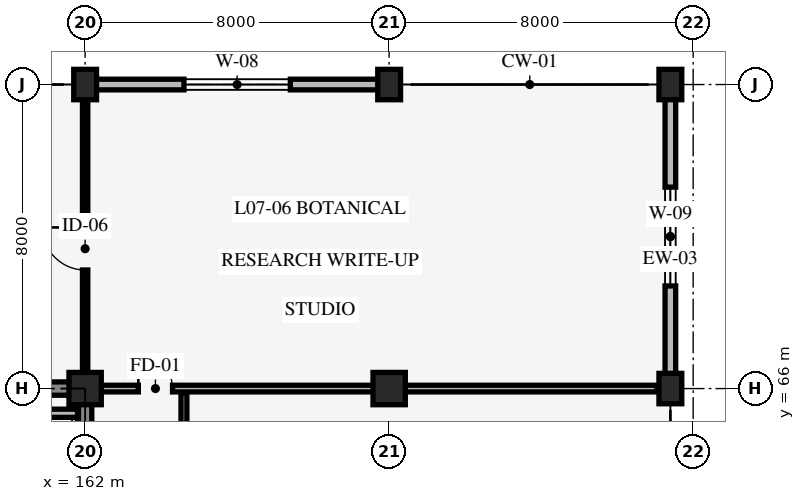
"""IFC4 building model, lengths in metres.
Left out: names, types, materials, properties, quantities, classifications, styles, units other than length and angle.
Written with IfcOpenShell. Run it as: python <this file> out.ifc"""

import sys

from ifc_helpers import new_model, si_unit, direction, frame, frame_2d, origin, origin_2d, place, context, subcontext, project, spatial, rectangle, extrude, element, fill, save


model = new_model("IFC4")
c1 = context("Model", 3, precision=1e-05, world=origin(), true_north=direction((0.0, 1.0)))
c2 = subcontext(c1, "Body", "Model", "MODEL_VIEW")
j1 = project(units=[si_unit("LENGTHUNIT", "METRE"), si_unit("PLANEANGLEUNIT", "RADIAN")], contexts=[c1])
p1 = place(None, origin())
s1 = spatial("IfcSite", under=j1, at=p1, CompositionType="ELEMENT")
p2 = place(p1, origin())
s2 = spatial("IfcBuilding", under=s1, at=p2, CompositionType="ELEMENT")
p3 = place(p2, frame((0.0, 0.0, 27.6)))
s3 = spatial("IfcBuildingStorey", under=s2, at=p3, CompositionType="ELEMENT", Elevation=27.6)
p4 = place(p3, frame((162.0, 58.0, 0.0), z_axis=(0.0, 0.0, 1.0), x_axis=(0.0, 1.0, 0.0)))
e1 = element("IfcWall", 1, at=p4, inside=s3, PredefinedType="SHEAR", context=c2, shape_type="SweptSolid", body=[
    extrude(rectangle(XDim=8.0, YDim=0.35, at=frame_2d((4.0, 0.0))), origin(), (0.0, 0.0, 1.0), 3.95),
])
p5 = place(p4, frame((3.275, 0.0, 0.0)))
e2 = element("IfcOpeningElement", 2, at=p5, cuts=e1, PredefinedType="OPENING", context=c2, shape_type="SweptSolid", body=[
    extrude(rectangle(XDim=1.05, YDim=2.2, at=frame_2d((0.525, 1.1))), frame((0.0, 0.185, 0.0), z_axis=(0.0, -1.0, 0.0), x_axis=(1.0, 0.0, 0.0)), (0.0, 0.0, 1.0), 0.37),
])
p6 = place(p4, frame((5.45, 0.0, 0.0)))
e3 = element("IfcOpeningElement", 3, at=p6, cuts=e1, PredefinedType="OPENING", context=c2, shape_type="SweptSolid", body=[
    extrude(rectangle(XDim=1.4, YDim=2.3, at=frame_2d((0.7, 1.15))), frame((0.0, 0.185, 0.0), z_axis=(0.0, -1.0, 0.0), x_axis=(1.0, 0.0, 0.0)), (0.0, 0.0, 1.0), 0.37),
])
p7 = place(p3, frame((162.0, 66.0, 0.0), z_axis=(0.0, 0.0, 1.0), x_axis=(-1.0, 0.0, 0.0)))
e4 = element("IfcWall", 4, at=p7, inside=s3, PredefinedType="SHEAR", context=c2, shape_type="SweptSolid", body=[
    extrude(rectangle(XDim=8.0, YDim=0.35, at=frame_2d((4.0, 0.0))), origin(), (0.0, 0.0, 1.0), 3.95),
])
p8 = place(p3, frame((162.0, 66.0, 0.0), z_axis=(0.0, 0.0, 1.0), x_axis=(1.0, 0.0, 0.0)))
e5 = element("IfcColumn", 5, at=p8, inside=s3, PredefinedType="COLUMN", context=c2, shape_type="SweptSolid", body=[
    extrude(rectangle(XDim=0.85, YDim=0.85, at=origin_2d()), origin(), (0.0, 0.0, 1.0), 4.2),
])
p9 = place(p3, frame((162.0, 74.0, 0.0), z_axis=(0.0, 0.0, 1.0), x_axis=(1.0, 0.0, 0.0)))
e6 = element("IfcColumn", 6, at=p9, inside=s3, PredefinedType="COLUMN", context=c2, shape_type="SweptSolid", body=[
    extrude(rectangle(XDim=0.6, YDim=0.8, at=origin_2d()), origin(), (0.0, 0.0, 1.0), 4.2),
])
p10 = place(p3, frame((170.0, 66.0, 0.0), z_axis=(0.0, 0.0, 1.0), x_axis=(1.0, 0.0, 0.0)))
e7 = element("IfcColumn", 7, at=p10, inside=s3, PredefinedType="COLUMN", context=c2, shape_type="SweptSolid", body=[
    extrude(rectangle(XDim=0.85, YDim=0.85, at=origin_2d()), origin(), (0.0, 0.0, 1.0), 4.2),
])
for number, where, z_axis, x_axis in (
    (8, (170.0, 74.0, 0.0), (0.0, 0.0, 1.0), (1.0, 0.0, 0.0)),
    (9, (177.4, 66.0, 0.0), (0.0, 0.0, 1.0), (1.0, 0.0, 0.0)),
    (10, (177.4, 74.0, 0.0), (0.0, 0.0, 1.0), (1.0, 0.0, 0.0)),
):
    element("IfcColumn", number, at=place(p3, frame(where, z_axis=z_axis, x_axis=x_axis)), inside=s3, PredefinedType="COLUMN", context=c2, shape_type="SweptSolid", body=[
        extrude(rectangle(XDim=0.6, YDim=0.8, at=origin_2d()), origin(), (0.0, 0.0, 1.0), 4.2),
    ])
p11 = place(p3, frame((162.0, 74.0, 0.0), z_axis=(0.0, 0.0, 1.0), x_axis=(1.0, 0.0, 0.0)))
e11 = element("IfcWall", 11, at=p11, inside=s3, PredefinedType="STANDARD", context=c2, shape_type="SweptSolid", body=[
    extrude(rectangle(XDim=8.0, YDim=0.28, at=frame_2d((4.0, 0.0))), origin(), (0.0, 0.0, 1.0), 3.24),
])
p12 = place(p11, frame((2.6, 0.0, 0.85)))
e12 = element("IfcOpeningElement", 12, at=p12, cuts=e11, PredefinedType="OPENING", context=c2, shape_type="SweptSolid", body=[
    extrude(rectangle(XDim=2.8, YDim=1.6, at=frame_2d((1.4, 0.8))), frame((0.0, 0.15, 0.0), z_axis=(0.0, -1.0, 0.0), x_axis=(1.0, 0.0, 0.0)), (0.0, 0.0, 1.0), 0.3),
])
p13 = place(p3, frame((177.4, 74.0, 0.0), z_axis=(0.0, 0.0, 1.0), x_axis=(0.0, -1.0, 0.0)))
e13 = element("IfcWall", 13, at=p13, inside=s3, PredefinedType="STANDARD", context=c2, shape_type="SweptSolid", body=[
    extrude(rectangle(XDim=8.0, YDim=0.28, at=frame_2d((4.0, 0.0))), origin(), (0.0, 0.0, 1.0), 3.29),
])
p14 = place(p13, frame((2.7, 0.0, 0.85)))
e14 = element("IfcOpeningElement", 14, at=p14, cuts=e13, PredefinedType="OPENING", context=c2, shape_type="SweptSolid", body=[
    extrude(rectangle(XDim=2.6, YDim=1.5, at=frame_2d((1.3, 0.75))), frame((0.0, 0.15, 0.0), z_axis=(0.0, -1.0, 0.0), x_axis=(1.0, 0.0, 0.0)), (0.0, 0.0, 1.0), 0.3),
])
p15 = place(p3, frame((159.38, 65.35, 0.0), z_axis=(0.0, 0.0, 1.0), x_axis=(1.0, 0.0, 0.0)))
e15 = element("IfcWall", 15, at=p15, inside=s3, PredefinedType="STANDARD", context=c2, shape_type="SweptSolid", body=[
    extrude(rectangle(XDim=2.42, YDim=0.215, at=frame_2d((1.21, 0.0))), origin(), (0.0, 0.0, 1.0), 3.9),
])
p16 = place(p3, frame((164.6, 58.08, 0.0), z_axis=(0.0, 0.0, 1.0), x_axis=(0.0, 1.0, 0.0)))
e16 = element("IfcWall", 16, at=p16, inside=s3, PredefinedType="STANDARD", context=c2, shape_type="SweptSolid", body=[
    extrude(rectangle(XDim=7.8, YDim=0.155, at=frame_2d((3.9, 0.0))), origin(), (0.0, 0.0, 1.0), 3.9),
])
p17 = place(p16, frame((3.0, 0.0, 0.0)))
e17 = element("IfcOpeningElement", 17, at=p17, cuts=e16, PredefinedType="OPENING", context=c2, shape_type="SweptSolid", body=[
    extrude(rectangle(XDim=1.8, YDim=2.3, at=frame_2d((0.9, 1.15))), frame((0.0, 0.087, 0.0), z_axis=(0.0, -1.0, 0.0), x_axis=(1.0, 0.0, 0.0)), (0.0, 0.0, 1.0), 0.175),
])
p18 = place(p3, frame((162.0, 66.12, 0.0), z_axis=(0.0, 0.0, 1.0), x_axis=(0.0, 1.0, 0.0)))
e18 = element("IfcWall", 18, at=p18, inside=s3, PredefinedType="STANDARD", context=c2, shape_type="SweptSolid", body=[
    extrude(rectangle(XDim=7.83, YDim=0.14, at=frame_2d((3.915, 0.0))), origin(), (0.0, 0.0, 1.0), 3.29),
])
p19 = place(p18, frame((3.0, 0.0, 0.0)))
e19 = element("IfcOpeningElement", 19, at=p19, cuts=e18, PredefinedType="OPENING", context=c2, shape_type="SweptSolid", body=[
    extrude(rectangle(XDim=1.12, YDim=2.12, at=frame_2d((0.56, 1.06))), frame((0.0, 0.08, 0.0), z_axis=(0.0, -1.0, 0.0), x_axis=(1.0, 0.0, 0.0)), (0.0, 0.0, 1.0), 0.16),
])
p20 = place(p3, frame((162.35, 66.0, 0.0), z_axis=(0.0, 0.0, 1.0), x_axis=(1.0, 0.0, 0.0)))
e20 = element("IfcWall", 20, at=p20, inside=s3, PredefinedType="STANDARD", context=c2, shape_type="SweptSolid", body=[
    extrude(rectangle(XDim=14.7, YDim=0.175, at=frame_2d((7.35, 0.0))), origin(), (0.0, 0.0, 1.0), 3.24),
])
p21 = place(p20, frame((1.05, 0.0, 0.0)))
e21 = element("IfcOpeningElement", 21, at=p21, cuts=e20, PredefinedType="OPENING", context=c2, shape_type="SweptSolid", body=[
    extrude(rectangle(XDim=0.9, YDim=2.1, at=frame_2d((0.45, 1.05))), frame((0.0, 0.098, 0.0), z_axis=(0.0, -1.0, 0.0), x_axis=(1.0, 0.0, 0.0)), (0.0, 0.0, 1.0), 0.195),
])
p22 = place(p12, origin())
e22 = element("IfcWindow", 22, at=p22, inside=s3, PartitioningType="SINGLE_PANEL", PredefinedType="WINDOW", context=c2, shape_type="SweptSolid", body=[
    extrude(rectangle(XDim=2.8, YDim=1.6, at=frame_2d((1.4, 0.8))), frame((0.0, 0.03, 0.0), z_axis=(0.0, -1.0, 0.0), x_axis=(1.0, 0.0, 0.0)), (0.0, 0.0, 1.0), 0.06),
])
fill(e12, e22)
p23 = place(p14, origin())
e23 = element("IfcWindow", 23, at=p23, inside=s3, PartitioningType="SINGLE_PANEL", PredefinedType="WINDOW", context=c2, shape_type="SweptSolid", body=[
    extrude(rectangle(XDim=2.6, YDim=1.5, at=frame_2d((1.3, 0.75))), frame((0.0, 0.03, 0.0), z_axis=(0.0, -1.0, 0.0), x_axis=(1.0, 0.0, 0.0)), (0.0, 0.0, 1.0), 0.06),
])
fill(e14, e23)
p24 = place(p19, origin())
e24 = element("IfcDoor", 24, at=p24, inside=s3, OperationType="SINGLE_SWING_RIGHT", PredefinedType="DOOR", context=c2, shape_type="SweptSolid", body=[
    extrude(rectangle(XDim=1.12, YDim=2.12, at=frame_2d((0.56, 1.06))), frame((0.0, 0.025, 0.0), z_axis=(0.0, -1.0, 0.0), x_axis=(1.0, 0.0, 0.0)), (0.0, 0.0, 1.0), 0.05),
])
fill(e19, e24)
p25 = place(p21, origin())
e25 = element("IfcDoor", 25, at=p25, inside=s3, OperationType="SINGLE_SWING_LEFT", PredefinedType="DOOR", context=c2, shape_type="SweptSolid", body=[
    extrude(rectangle(XDim=0.9, YDim=2.1, at=frame_2d((0.45, 1.05))), frame((0.0, 0.025, 0.0), z_axis=(0.0, -1.0, 0.0), x_axis=(1.0, 0.0, 0.0)), (0.0, 0.0, 1.0), 0.05),
])
fill(e21, e25)
save(model, sys.argv[1])
